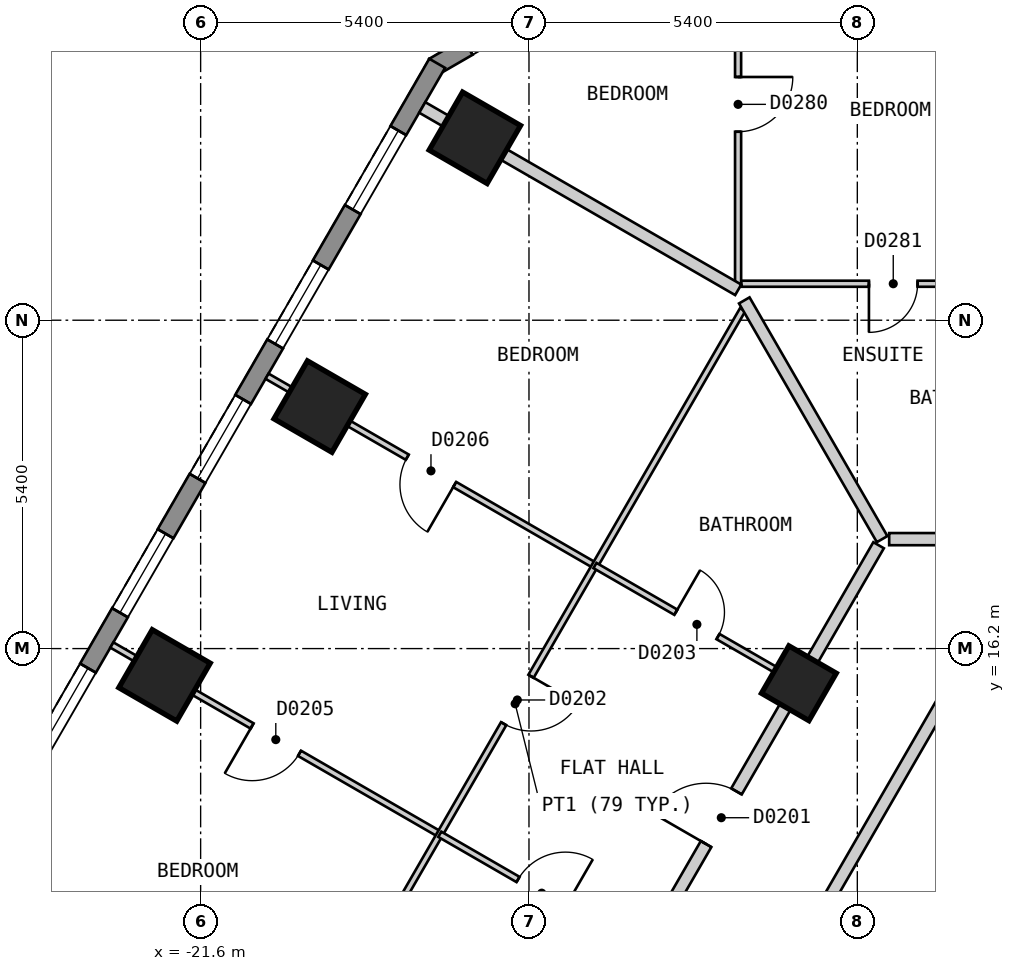
"""IFC4 building model, lengths in metres.
Left out: names, types, materials, properties, quantities, classifications, styles, units other than length and angle.
Written with IfcOpenShell. Run it as: python <this file> out.ifc"""

import sys

from ifc_helpers import new_model, si_unit, direction, frame, frame_2d, origin, origin_2d, place, context, subcontext, project, spatial, polyline, rectangle, outline, extrude, element, fill, save


model = new_model("IFC4")
c1 = context("Model", 3, precision=1e-05, world=origin(), true_north=direction((0.0, 1.0)))
c2 = subcontext(c1, "Body", "Model", "MODEL_VIEW")
j1 = project(units=[si_unit("LENGTHUNIT", "METRE"), si_unit("PLANEANGLEUNIT", "RADIAN")], contexts=[c1])
p1 = place(None, origin())
s1 = spatial("IfcSite", under=j1, at=p1, CompositionType="ELEMENT")
p2 = place(p1, origin())
s2 = spatial("IfcBuilding", under=s1, at=p2, CompositionType="ELEMENT")
p3 = place(p2, frame((0.0, 0.0, 41.4)))
s3 = spatial("IfcBuildingStorey", under=s2, at=p3, CompositionType="ELEMENT", Elevation=41.4)
for number, where, z_axis, x_axis in (
    (1, (-17.09, 24.6, 0.0), (0.0, 0.0, 1.0), (-0.5, -0.866, 0.0)),
    (2, (-19.642, 20.18, 0.0), (0.0, 0.0, 1.0), (-0.5, -0.866, 0.0)),
    (3, (-22.194, 15.759, 0.0), (0.0, 0.0, 1.0), (-0.5, -0.866, 0.0)),
):
    element("IfcColumn", number, at=place(p3, frame(where, z_axis=z_axis, x_axis=x_axis)), inside=s3, PredefinedType="COLUMN", context=c2, shape_type="SweptSolid", body=[
        extrude(rectangle(XDim=1.1, YDim=1.1, at=origin_2d()), origin(), (0.0, 0.0, 1.0), 3.0),
    ])
p4 = place(p3, frame((-11.761, 15.63, 0.0), z_axis=(0.0, 0.0, 1.0), x_axis=(-0.499984884929, -0.866034130299, 0.0)))
e4 = element("IfcColumn", 4, at=p4, inside=s3, PredefinedType="COLUMN", context=c2, shape_type="SweptSolid", body=[
    extrude(rectangle(XDim=0.9, YDim=0.9, at=origin_2d()), origin(), (0.0, 0.0, 1.0), 3.0),
])
p5 = place(p3, frame((-13.435, 28.27, 0.0), z_axis=(0.0, 0.0, 1.0), x_axis=(-0.866010750942, -0.50002537861, 0.0)))
e5 = element("IfcWall", 5, at=p5, inside=s3, PredefinedType="SOLIDWALL", context=c2, shape_type="SweptSolid", body=[
    extrude(outline(polyline([(0.0, -0.15), (5.0, -0.15), (4.919, 0.15), (0.08, 0.15), (0.0, -0.15)])), origin(), (0.0, 0.0, 1.0), 2.7),
])
p6 = place(p5, frame((0.65, 0.0, 0.15)))
e6 = element("IfcOpeningElement", 6, at=p6, cuts=e5, PredefinedType="OPENING", context=c2, shape_type="SweptSolid", body=[
    extrude(rectangle(XDim=1.2, YDim=2.1, at=frame_2d((0.6, 1.05))), frame((0.0, 0.16, 0.0), z_axis=(0.0, -1.0, 0.0), x_axis=(1.0, 0.0, 0.0)), (0.0, 0.0, 1.0), 0.32),
])
p7 = place(p5, frame((3.149, 0.0, 0.15)))
e7 = element("IfcOpeningElement", 7, at=p7, cuts=e5, PredefinedType="OPENING", context=c2, shape_type="SweptSolid", body=[
    extrude(rectangle(XDim=1.2, YDim=2.1, at=frame_2d((0.6, 1.05))), frame((0.0, 0.16, 0.0), z_axis=(0.0, -1.0, 0.0), x_axis=(1.0, 0.0, 0.0)), (0.0, 0.0, 1.0), 0.32),
])
p8 = place(p3, frame((-17.71, 25.825, 0.0), z_axis=(0.0, 0.0, 1.0), x_axis=(-0.500001938803, -0.866024284413, 0.0)))
e8 = element("IfcWall", 8, at=p8, inside=s3, PredefinedType="SOLIDWALL", context=c2, shape_type="SweptSolid", body=[
    extrude(outline(polyline([(0.0, -0.15), (27.02, -0.15), (26.94, 0.15), (0.08, 0.15), (0.0, -0.15)])), origin(), (0.0, 0.0, 1.0), 2.7),
])
p9 = place(p8, frame((1.277, 0.0, 0.15)))
e9 = element("IfcOpeningElement", 9, at=p9, cuts=e8, PredefinedType="OPENING", context=c2, shape_type="SweptSolid", body=[
    extrude(rectangle(XDim=1.5, YDim=2.1, at=frame_2d((0.75, 1.05))), frame((0.0, 0.16, 0.0), z_axis=(0.0, -1.0, 0.0), x_axis=(1.0, 0.0, 0.0)), (0.0, 0.0, 1.0), 0.32),
])
p10 = place(p8, frame((3.829, 0.0, 0.15)))
e10 = element("IfcOpeningElement", 10, at=p10, cuts=e8, PredefinedType="OPENING", context=c2, shape_type="SweptSolid", body=[
    extrude(rectangle(XDim=1.5, YDim=2.1, at=frame_2d((0.75, 1.05))), frame((0.0, 0.16, 0.0), z_axis=(0.0, -1.0, 0.0), x_axis=(1.0, 0.0, 0.0)), (0.0, 0.0, 1.0), 0.32),
])
p11 = place(p8, frame((6.382, 0.0, 0.15)))
e11 = element("IfcOpeningElement", 11, at=p11, cuts=e8, PredefinedType="OPENING", context=c2, shape_type="SweptSolid", body=[
    extrude(rectangle(XDim=1.5, YDim=2.1, at=frame_2d((0.75, 1.05))), frame((0.0, 0.16, 0.0), z_axis=(0.0, -1.0, 0.0), x_axis=(1.0, 0.0, 0.0)), (0.0, 0.0, 1.0), 0.32),
])
p12 = place(p8, frame((8.933, 0.0, 0.15)))
e12 = element("IfcOpeningElement", 12, at=p12, cuts=e8, PredefinedType="OPENING", context=c2, shape_type="SweptSolid", body=[
    extrude(rectangle(XDim=1.5, YDim=2.1, at=frame_2d((0.75, 1.05))), frame((0.0, 0.16, 0.0), z_axis=(0.0, -1.0, 0.0), x_axis=(1.0, 0.0, 0.0)), (0.0, 0.0, 1.0), 0.32),
])
p13 = place(p8, frame((11.485, 0.0, 0.15)))
e13 = element("IfcOpeningElement", 13, at=p13, cuts=e8, PredefinedType="OPENING", context=c2, shape_type="SweptSolid", body=[
    extrude(rectangle(XDim=1.5, YDim=2.1, at=frame_2d((0.75, 1.05))), frame((0.0, 0.16, 0.0), z_axis=(0.0, -1.0, 0.0), x_axis=(1.0, 0.0, 0.0)), (0.0, 0.0, 1.0), 0.32),
])
p14 = place(p8, frame((14.037, 0.0, 0.15)))
e14 = element("IfcOpeningElement", 14, at=p14, cuts=e8, PredefinedType="OPENING", context=c2, shape_type="SweptSolid", body=[
    extrude(rectangle(XDim=1.5, YDim=2.1, at=frame_2d((0.75, 1.05))), frame((0.0, 0.16, 0.0), z_axis=(0.0, -1.0, 0.0), x_axis=(1.0, 0.0, 0.0)), (0.0, 0.0, 1.0), 0.32),
])
p15 = place(p8, frame((16.589, 0.0, 0.15)))
e15 = element("IfcOpeningElement", 15, at=p15, cuts=e8, PredefinedType="OPENING", context=c2, shape_type="SweptSolid", body=[
    extrude(rectangle(XDim=1.5, YDim=2.1, at=frame_2d((0.75, 1.05))), frame((0.0, 0.16, 0.0), z_axis=(0.0, -1.0, 0.0), x_axis=(1.0, 0.0, 0.0)), (0.0, 0.0, 1.0), 0.32),
])
p16 = place(p8, frame((19.141, 0.0, 0.15)))
e16 = element("IfcOpeningElement", 16, at=p16, cuts=e8, PredefinedType="OPENING", context=c2, shape_type="SweptSolid", body=[
    extrude(rectangle(XDim=1.5, YDim=2.1, at=frame_2d((0.75, 1.05))), frame((0.0, 0.16, 0.0), z_axis=(0.0, -1.0, 0.0), x_axis=(1.0, 0.0, 0.0)), (0.0, 0.0, 1.0), 0.32),
])
p17 = place(p8, frame((21.693, 0.0, 0.15)))
e17 = element("IfcOpeningElement", 17, at=p17, cuts=e8, PredefinedType="OPENING", context=c2, shape_type="SweptSolid", body=[
    extrude(rectangle(XDim=1.5, YDim=2.1, at=frame_2d((0.75, 1.05))), frame((0.0, 0.16, 0.0), z_axis=(0.0, -1.0, 0.0), x_axis=(1.0, 0.0, 0.0)), (0.0, 0.0, 1.0), 0.32),
])
p18 = place(p8, frame((24.244, 0.0, 0.15)))
e18 = element("IfcOpeningElement", 18, at=p18, cuts=e8, PredefinedType="OPENING", context=c2, shape_type="SweptSolid", body=[
    extrude(rectangle(XDim=1.5, YDim=2.1, at=frame_2d((0.75, 1.05))), frame((0.0, 0.16, 0.0), z_axis=(0.0, -1.0, 0.0), x_axis=(1.0, 0.0, 0.0)), (0.0, 0.0, 1.0), 0.32),
])
p19 = place(p3, frame((-10.276, 18.0, 0.0), z_axis=(0.0, 0.0, 1.0), x_axis=(1.0, 0.0, 0.0)))
e19 = element("IfcWall", 19, at=p19, inside=s3, PredefinedType="PARTITIONING", context=c2, shape_type="SweptSolid", body=[
    extrude(rectangle(XDim=20.558, YDim=0.2, at=frame_2d((10.279, 0.0))), origin(), (0.0, 0.0, 1.0), 2.7),
])
p20 = place(p19, frame((19.265, 0.0, 0.0)))
e20 = element("IfcOpeningElement", 20, at=p20, cuts=e19, PredefinedType="OPENING", context=c2, shape_type="SweptSolid", body=[
    extrude(rectangle(XDim=1.0, YDim=2.1, at=frame_2d((0.5, 1.05))), frame((0.0, 0.11, 0.0), z_axis=(0.0, -1.0, 0.0), x_axis=(1.0, 0.0, 0.0)), (0.0, 0.0, 1.0), 0.22),
])
p21 = place(p19, frame((14.879, 0.0, 0.0)))
e21 = element("IfcOpeningElement", 21, at=p21, cuts=e19, PredefinedType="OPENING", context=c2, shape_type="SweptSolid", body=[
    extrude(rectangle(XDim=1.0, YDim=2.1, at=frame_2d((0.5, 1.05))), frame((0.0, 0.11, 0.0), z_axis=(0.0, -1.0, 0.0), x_axis=(1.0, 0.0, 0.0)), (0.0, 0.0, 1.0), 0.22),
])
p22 = place(p19, frame((4.671, 0.0, 0.0)))
e22 = element("IfcOpeningElement", 22, at=p22, cuts=e19, PredefinedType="OPENING", context=c2, shape_type="SweptSolid", body=[
    extrude(rectangle(XDim=1.0, YDim=2.1, at=frame_2d((0.5, 1.05))), frame((0.0, 0.11, 0.0), z_axis=(0.0, -1.0, 0.0), x_axis=(1.0, 0.0, 0.0)), (0.0, 0.0, 1.0), 0.22),
])
p23 = place(p3, frame((-10.854, 8.0, 0.0), z_axis=(0.0, 0.0, 1.0), x_axis=(0.499964141897, 0.86604610548, 0.0)))
e23 = element("IfcWall", 23, at=p23, inside=s3, PredefinedType="PARTITIONING", context=c2, shape_type="SweptSolid", body=[
    extrude(rectangle(XDim=9.007, YDim=0.2, at=frame_2d((4.503, 0.0))), origin(), (0.0, 0.0, 1.0), 2.7),
])
p24 = place(p3, frame((-18.244, -0.001, 0.0), z_axis=(0.0, 0.0, 1.0), x_axis=(0.499962999376, 0.866046765051, 0.0)))
e24 = element("IfcWall", 24, at=p24, inside=s3, PredefinedType="PARTITIONING", context=c2, shape_type="SweptSolid", body=[
    extrude(rectangle(XDim=18.245, YDim=0.2, at=frame_2d((9.123, 0.0))), origin(), (0.0, 0.0, 1.0), 2.7),
])
p25 = place(p24, frame((8.672, 0.0, 0.0)))
e25 = element("IfcOpeningElement", 25, at=p25, cuts=e24, PredefinedType="OPENING", context=c2, shape_type="SweptSolid", body=[
    extrude(rectangle(XDim=0.9, YDim=2.1, at=frame_2d((0.45, 1.05))), frame((0.0, 0.11, 0.0), z_axis=(0.0, -1.0, 0.0), x_axis=(1.0, 0.0, 0.0)), (0.0, 0.0, 1.0), 0.22),
])
p26 = place(p3, frame((-20.727, 0.099, 0.0), z_axis=(0.0, 0.0, 1.0), x_axis=(0.499993204491, 0.866029327138, 0.0)))
e26 = element("IfcWall", 26, at=p26, inside=s3, PredefinedType="PARTITIONING", context=c2, shape_type="SweptSolid", body=[
    extrude(rectangle(XDim=20.554, YDim=0.2, at=frame_2d((10.277, 0.0))), origin(), (0.0, 0.0, 1.0), 2.7),
])
p27 = place(p26, frame((14.88, 0.0, 0.0)))
e27 = element("IfcOpeningElement", 27, at=p27, cuts=e26, PredefinedType="OPENING", context=c2, shape_type="SweptSolid", body=[
    extrude(rectangle(XDim=1.0, YDim=2.1, at=frame_2d((0.5, 1.05))), frame((0.0, 0.11, 0.0), z_axis=(0.0, -1.0, 0.0), x_axis=(1.0, 0.0, 0.0)), (0.0, 0.0, 1.0), 0.22),
])
p28 = place(p26, frame((4.673, 0.0, 0.0)))
e28 = element("IfcOpeningElement", 28, at=p28, cuts=e26, PredefinedType="OPENING", context=c2, shape_type="SweptSolid", body=[
    extrude(rectangle(XDim=1.0, YDim=2.1, at=frame_2d((0.5, 1.05))), frame((0.0, 0.11, 0.0), z_axis=(0.0, -1.0, 0.0), x_axis=(1.0, 0.0, 0.0)), (0.0, 0.0, 1.0), 0.22),
])
p29 = place(p26, frame((0.838, 0.0, 0.0)))
e29 = element("IfcOpeningElement", 29, at=p29, cuts=e26, PredefinedType="OPENING", context=c2, shape_type="SweptSolid", body=[
    extrude(rectangle(XDim=0.8, YDim=2.1, at=frame_2d((0.4, 1.05))), frame((0.0, 0.11, 0.0), z_axis=(0.0, -1.0, 0.0), x_axis=(1.0, 0.0, 0.0)), (0.0, 0.0, 1.0), 0.22),
])
p30 = place(p3, frame((-20.508, 20.679, 0.0), z_axis=(0.0, 0.0, 1.0), x_axis=(0.86607068519, -0.499921562103, 0.0)))
e30 = element("IfcWall", 30, at=p30, inside=s3, PredefinedType="PARTITIONING", context=c2, shape_type="SweptSolid", body=[
    extrude(rectangle(XDim=6.227, YDim=0.1, at=frame_2d((3.114, 0.0))), origin(), (0.0, 0.0, 1.0), 2.7),
])
p31 = place(p30, frame((2.663, 0.0, 0.0)))
e31 = element("IfcOpeningElement", 31, at=p31, cuts=e30, PredefinedType="OPENING", context=c2, shape_type="SweptSolid", body=[
    extrude(rectangle(XDim=0.9, YDim=2.1, at=frame_2d((0.45, 1.05))), frame((0.0, 0.06, 0.0), z_axis=(0.0, -1.0, 0.0), x_axis=(1.0, 0.0, 0.0)), (0.0, 0.0, 1.0), 0.12),
])
p32 = place(p3, frame((-23.06, 16.259, 0.0), z_axis=(0.0, 0.0, 1.0), x_axis=(0.86607068519, -0.499921562103, 0.0)))
e32 = element("IfcWall", 32, at=p32, inside=s3, PredefinedType="PARTITIONING", context=c2, shape_type="SweptSolid", body=[
    extrude(rectangle(XDim=6.227, YDim=0.1, at=frame_2d((3.114, 0.0))), origin(), (0.0, 0.0, 1.0), 2.7),
])
p33 = place(p32, frame((2.663, 0.0, 0.0)))
e33 = element("IfcOpeningElement", 33, at=p33, cuts=e32, PredefinedType="OPENING", context=c2, shape_type="SweptSolid", body=[
    extrude(rectangle(XDim=0.9, YDim=2.1, at=frame_2d((0.45, 1.05))), frame((0.0, 0.06, 0.0), z_axis=(0.0, -1.0, 0.0), x_axis=(1.0, 0.0, 0.0)), (0.0, 0.0, 1.0), 0.12),
])
p34 = place(p3, frame((-12.711, 22.2, 0.0), z_axis=(0.0, 0.0, 1.0), x_axis=(1.0, 0.0, 0.0)))
e34 = element("IfcWall", 34, at=p34, inside=s3, PredefinedType="PARTITIONING", context=c2, shape_type="SweptSolid", body=[
    extrude(rectangle(XDim=10.058, YDim=0.1, at=frame_2d((5.029, 0.0))), origin(), (0.0, 0.0, 1.0), 2.7),
])
p35 = place(p34, frame((7.156, 0.0, 0.0)))
e35 = element("IfcOpeningElement", 35, at=p35, cuts=e34, PredefinedType="OPENING", context=c2, shape_type="SweptSolid", body=[
    extrude(rectangle(XDim=0.9, YDim=2.1, at=frame_2d((0.45, 1.05))), frame((0.0, 0.06, 0.0), z_axis=(0.0, -1.0, 0.0), x_axis=(1.0, 0.0, 0.0)), (0.0, 0.0, 1.0), 0.12),
])
p36 = place(p34, frame((2.102, 0.0, 0.0)))
e36 = element("IfcOpeningElement", 36, at=p36, cuts=e34, PredefinedType="OPENING", context=c2, shape_type="SweptSolid", body=[
    extrude(rectangle(XDim=0.8, YDim=2.1, at=frame_2d((0.4, 1.05))), frame((0.0, 0.06, 0.0), z_axis=(0.0, -1.0, 0.0), x_axis=(1.0, 0.0, 0.0)), (0.0, 0.0, 1.0), 0.12),
])
p37 = place(p3, frame((-20.169, 8.812, 0.0), z_axis=(0.0, 0.0, 1.0), x_axis=(0.499995459772, 0.86602802507, 0.0)))
e37 = element("IfcWall", 37, at=p37, inside=s3, PredefinedType="PARTITIONING", context=c2, shape_type="SweptSolid", body=[
    extrude(rectangle(XDim=14.966, YDim=0.1, at=frame_2d((7.483, 0.0))), origin(), (0.0, 0.0, 1.0), 2.7),
])
p38 = place(p37, frame((7.105, 0.0, 0.0)))
e38 = element("IfcOpeningElement", 38, at=p38, cuts=e37, PredefinedType="OPENING", context=c2, shape_type="SweptSolid", body=[
    extrude(rectangle(XDim=0.9, YDim=2.1, at=frame_2d((0.45, 1.05))), frame((0.0, 0.06, 0.0), z_axis=(0.0, -1.0, 0.0), x_axis=(1.0, 0.0, 0.0)), (0.0, 0.0, 1.0), 0.12),
])
p39 = place(p3, frame((-12.761, 22.2, 0.0), z_axis=(0.0, 0.0, 1.0), x_axis=(0.0, 1.0, 0.0)))
e39 = element("IfcWall", 39, at=p39, inside=s3, PredefinedType="PARTITIONING", context=c2, shape_type="SweptSolid", body=[
    extrude(rectangle(XDim=5.9, YDim=0.1, at=frame_2d((2.95, 0.0))), origin(), (0.0, 0.0, 1.0), 2.7),
])
p40 = place(p39, frame((2.5, 0.0, 0.0)))
e40 = element("IfcOpeningElement", 40, at=p40, cuts=e39, PredefinedType="OPENING", context=c2, shape_type="SweptSolid", body=[
    extrude(rectangle(XDim=0.9, YDim=2.1, at=frame_2d((0.45, 1.05))), frame((0.0, 0.06, 0.0), z_axis=(0.0, -1.0, 0.0), x_axis=(1.0, 0.0, 0.0)), (0.0, 0.0, 1.0), 0.12),
])
p41 = place(p3, frame((-12.659, 21.926, 0.0), z_axis=(0.0, 0.0, 1.0), x_axis=(0.500025458316, -0.86601070492, 0.0)))
e41 = element("IfcWall", 41, at=p41, inside=s3, PredefinedType="PARTITIONING", context=c2, shape_type="SweptSolid", body=[
    extrude(rectangle(XDim=4.533, YDim=0.2, at=frame_2d((2.267, 0.0))), origin(), (0.0, 0.0, 1.0), 2.7),
])
p42 = place(p3, frame((-17.955, 25.099, 0.0), z_axis=(0.0, 0.0, 1.0), x_axis=(0.86609140076, -0.499885672459, 0.0)))
e42 = element("IfcWall", 42, at=p42, inside=s3, PredefinedType="PARTITIONING", context=c2, shape_type="SweptSolid", body=[
    extrude(rectangle(XDim=6.0, YDim=0.2, at=frame_2d((3.0, 0.0))), origin(), (0.0, 0.0, 1.0), 2.7),
])
p43 = place(p3, frame((-15.115, 17.566, 0.0), z_axis=(0.0, 0.0, 1.0), x_axis=(0.866008894869, -0.50002859319, 0.0)))
e43 = element("IfcWall", 43, at=p43, inside=s3, PredefinedType="PARTITIONING", context=c2, shape_type="SweptSolid", body=[
    extrude(rectangle(XDim=3.774, YDim=0.1, at=frame_2d((1.887, 0.0))), origin(), (0.0, 0.0, 1.0), 2.7),
])
p44 = place(p43, frame((1.536, 0.0, 0.0)))
e44 = element("IfcOpeningElement", 44, at=p44, cuts=e43, PredefinedType="OPENING", context=c2, shape_type="SweptSolid", body=[
    extrude(rectangle(XDim=0.8, YDim=2.1, at=frame_2d((0.4, 1.05))), frame((0.0, 0.06, 0.0), z_axis=(0.0, -1.0, 0.0), x_axis=(1.0, 0.0, 0.0)), (0.0, 0.0, 1.0), 0.12),
])
p45 = place(p3, frame((-17.667, 13.146, 0.0), z_axis=(0.0, 0.0, 1.0), x_axis=(0.866008894869, -0.50002859319, 0.0)))
e45 = element("IfcWall", 45, at=p45, inside=s3, PredefinedType="PARTITIONING", context=c2, shape_type="SweptSolid", body=[
    extrude(rectangle(XDim=3.774, YDim=0.1, at=frame_2d((1.887, 0.0))), origin(), (0.0, 0.0, 1.0), 2.7),
])
p46 = place(p45, frame((1.486, 0.0, 0.0)))
e46 = element("IfcOpeningElement", 46, at=p46, cuts=e45, PredefinedType="OPENING", context=c2, shape_type="SweptSolid", body=[
    extrude(rectangle(XDim=0.9, YDim=2.1, at=frame_2d((0.45, 1.05))), frame((0.0, 0.06, 0.0), z_axis=(0.0, -1.0, 0.0), x_axis=(1.0, 0.0, 0.0)), (0.0, 0.0, 1.0), 0.12),
])
p47 = place(p9, origin())
e47 = element("IfcWindow", 47, at=p47, inside=s3, PartitioningType="SINGLE_PANEL", PredefinedType="WINDOW", context=c2, shape_type="SweptSolid", body=[
    extrude(rectangle(XDim=1.5, YDim=2.1, at=frame_2d((0.75, 1.05))), frame((0.0, 0.03, 0.0), z_axis=(0.0, -1.0, 0.0), x_axis=(1.0, 0.0, 0.0)), (0.0, 0.0, 1.0), 0.06),
])
fill(e9, e47)
p48 = place(p10, origin())
e48 = element("IfcWindow", 48, at=p48, inside=s3, PartitioningType="SINGLE_PANEL", PredefinedType="WINDOW", context=c2, shape_type="SweptSolid", body=[
    extrude(rectangle(XDim=1.5, YDim=2.1, at=frame_2d((0.75, 1.05))), frame((0.0, 0.03, 0.0), z_axis=(0.0, -1.0, 0.0), x_axis=(1.0, 0.0, 0.0)), (0.0, 0.0, 1.0), 0.06),
])
fill(e10, e48)
p49 = place(p11, origin())
e49 = element("IfcWindow", 49, at=p49, inside=s3, PartitioningType="SINGLE_PANEL", PredefinedType="WINDOW", context=c2, shape_type="SweptSolid", body=[
    extrude(rectangle(XDim=1.5, YDim=2.1, at=frame_2d((0.75, 1.05))), frame((0.0, 0.03, 0.0), z_axis=(0.0, -1.0, 0.0), x_axis=(1.0, 0.0, 0.0)), (0.0, 0.0, 1.0), 0.06),
])
fill(e11, e49)
p50 = place(p12, origin())
e50 = element("IfcWindow", 50, at=p50, inside=s3, PartitioningType="SINGLE_PANEL", PredefinedType="WINDOW", context=c2, shape_type="SweptSolid", body=[
    extrude(rectangle(XDim=1.5, YDim=2.1, at=frame_2d((0.75, 1.05))), frame((0.0, 0.03, 0.0), z_axis=(0.0, -1.0, 0.0), x_axis=(1.0, 0.0, 0.0)), (0.0, 0.0, 1.0), 0.06),
])
fill(e12, e50)
p51 = place(p13, origin())
e51 = element("IfcWindow", 51, at=p51, inside=s3, PartitioningType="SINGLE_PANEL", PredefinedType="WINDOW", context=c2, shape_type="SweptSolid", body=[
    extrude(rectangle(XDim=1.5, YDim=2.1, at=frame_2d((0.75, 1.05))), frame((0.0, 0.03, 0.0), z_axis=(0.0, -1.0, 0.0), x_axis=(1.0, 0.0, 0.0)), (0.0, 0.0, 1.0), 0.06),
])
fill(e13, e51)
p52 = place(p27, origin())
e52 = element("IfcDoor", 52, at=p52, inside=s3, OperationType="SINGLE_SWING_LEFT", PredefinedType="DOOR", context=c2, shape_type="SweptSolid", body=[
    extrude(rectangle(XDim=1.0, YDim=2.1, at=frame_2d((0.5, 1.05))), frame((0.0, 0.025, 0.0), z_axis=(0.0, -1.0, 0.0), x_axis=(1.0, 0.0, 0.0)), (0.0, 0.0, 1.0), 0.05),
])
fill(e27, e52)
p53 = place(p38, origin())
e53 = element("IfcDoor", 53, at=p53, inside=s3, OperationType="SINGLE_SWING_RIGHT", PredefinedType="DOOR", context=c2, shape_type="SweptSolid", body=[
    extrude(rectangle(XDim=0.9, YDim=2.1, at=frame_2d((0.45, 1.05))), frame((0.0, 0.025, 0.0), z_axis=(0.0, -1.0, 0.0), x_axis=(1.0, 0.0, 0.0)), (0.0, 0.0, 1.0), 0.05),
])
fill(e38, e53)
p54 = place(p44, origin())
e54 = element("IfcDoor", 54, at=p54, inside=s3, OperationType="SINGLE_SWING_LEFT", PredefinedType="DOOR", context=c2, shape_type="SweptSolid", body=[
    extrude(rectangle(XDim=0.8, YDim=2.1, at=frame_2d((0.4, 1.05))), frame((0.0, 0.025, 0.0), z_axis=(0.0, -1.0, 0.0), x_axis=(1.0, 0.0, 0.0)), (0.0, 0.0, 1.0), 0.05),
])
fill(e44, e54)
p55 = place(p46, origin())
e55 = element("IfcDoor", 55, at=p55, inside=s3, OperationType="SINGLE_SWING_RIGHT", PredefinedType="DOOR", context=c2, shape_type="SweptSolid", body=[
    extrude(rectangle(XDim=0.9, YDim=2.1, at=frame_2d((0.45, 1.05))), frame((0.0, 0.025, 0.0), z_axis=(0.0, -1.0, 0.0), x_axis=(1.0, 0.0, 0.0)), (0.0, 0.0, 1.0), 0.05),
])
fill(e46, e55)
p56 = place(p33, origin())
e56 = element("IfcDoor", 56, at=p56, inside=s3, OperationType="SINGLE_SWING_LEFT", PredefinedType="DOOR", context=c2, shape_type="SweptSolid", body=[
    extrude(rectangle(XDim=0.9, YDim=2.1, at=frame_2d((0.45, 1.05))), frame((0.0, 0.025, 0.0), z_axis=(0.0, -1.0, 0.0), x_axis=(1.0, 0.0, 0.0)), (0.0, 0.0, 1.0), 0.05),
])
fill(e33, e56)
p57 = place(p31, origin())
e57 = element("IfcDoor", 57, at=p57, inside=s3, OperationType="SINGLE_SWING_RIGHT", PredefinedType="DOOR", context=c2, shape_type="SweptSolid", body=[
    extrude(rectangle(XDim=0.9, YDim=2.1, at=frame_2d((0.45, 1.05))), frame((0.0, 0.025, 0.0), z_axis=(0.0, -1.0, 0.0), x_axis=(1.0, 0.0, 0.0)), (0.0, 0.0, 1.0), 0.05),
])
fill(e31, e57)
p58 = place(p40, origin())
e58 = element("IfcDoor", 58, at=p58, inside=s3, OperationType="SINGLE_SWING_RIGHT", PredefinedType="DOOR", context=c2, shape_type="SweptSolid", body=[
    extrude(rectangle(XDim=0.9, YDim=2.1, at=frame_2d((0.45, 1.05))), frame((0.0, 0.025, 0.0), z_axis=(0.0, -1.0, 0.0), x_axis=(1.0, 0.0, 0.0)), (0.0, 0.0, 1.0), 0.05),
])
fill(e40, e58)
p59 = place(p36, origin())
e59 = element("IfcDoor", 59, at=p59, inside=s3, OperationType="SINGLE_SWING_LEFT", PredefinedType="DOOR", context=c2, shape_type="SweptSolid", body=[
    extrude(rectangle(XDim=0.8, YDim=2.1, at=frame_2d((0.4, 1.05))), frame((0.0, 0.025, 0.0), z_axis=(0.0, -1.0, 0.0), x_axis=(1.0, 0.0, 0.0)), (0.0, 0.0, 1.0), 0.05),
])
fill(e36, e59)
save(model, sys.argv[1])
